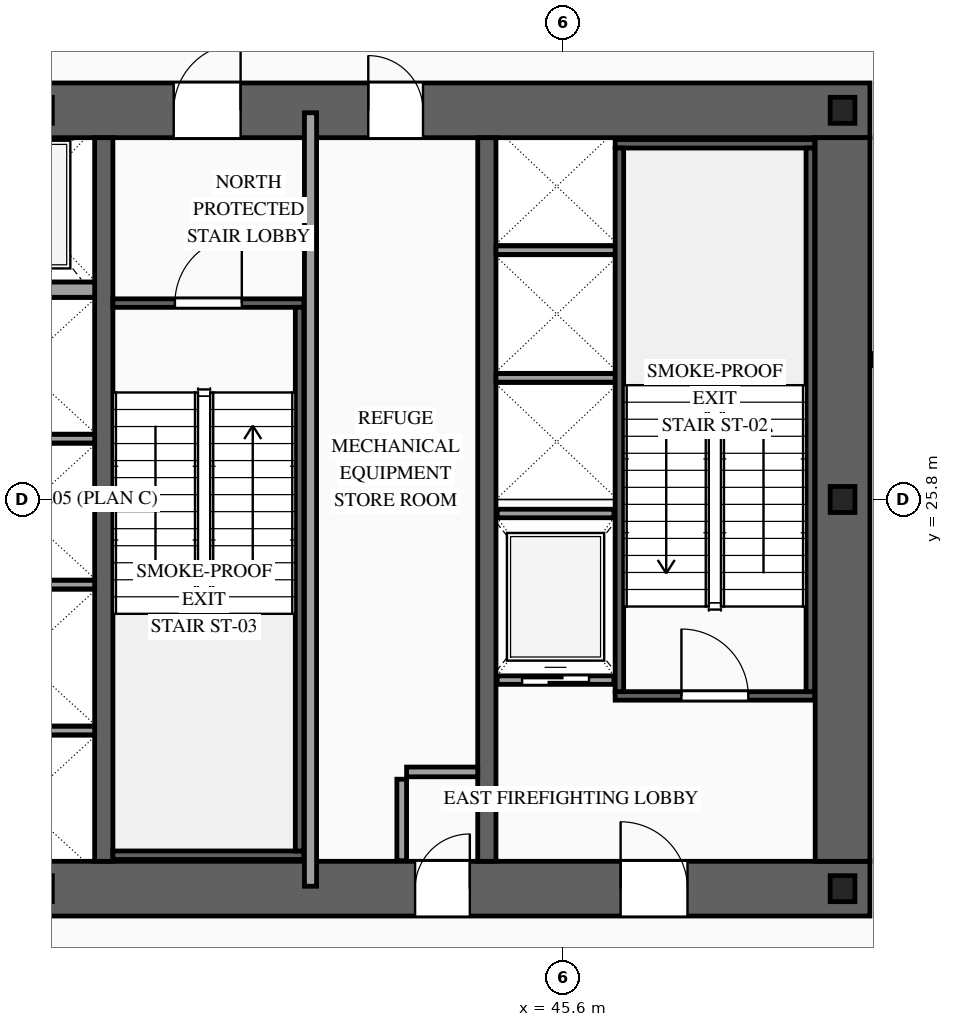
"""IFC4 building model, lengths in metres.
Left out: names, types, materials, properties, quantities, classifications, styles, units other than length and angle.
Written with IfcOpenShell. Run it as: python <this file> out.ifc"""

import sys

from ifc_helpers import new_model, si_unit, direction, frame, frame_2d, origin, origin_2d, place, context, subcontext, project, spatial, rectangle, i_section, extrude, source, transform, mapped, element, fill, save


model = new_model("IFC4")
c1 = context("Model", 3, precision=1e-05, world=origin(), true_north=direction((0.0, 1.0)))
c2 = subcontext(c1, "Body", "Model", "MODEL_VIEW")
j1 = project(units=[si_unit("LENGTHUNIT", "METRE"), si_unit("PLANEANGLEUNIT", "RADIAN")], contexts=[c1])
p1 = place(None, origin())
s1 = spatial("IfcSite", under=j1, at=p1, CompositionType="ELEMENT")
p2 = place(p1, origin())
s2 = spatial("IfcBuilding", under=s1, at=p2, CompositionType="ELEMENT")
p3 = place(p2, frame((0.0, 0.0, 41.4)))
s3 = spatial("IfcBuildingStorey", under=s2, at=p3, CompositionType="ELEMENT", Elevation=41.4)
p4 = place(p3, frame((23.35, 19.4, 0.0), z_axis=(0.0, 0.0, 1.0), x_axis=(1.0, 0.0, 0.0)))
e1 = element("IfcWall", 1, at=p4, inside=s3, PredefinedType="SHEAR", context=c2, shape_type="SweptSolid", body=[
    extrude(rectangle(XDim=27.3, YDim=0.9, at=frame_2d((13.65, 0.0))), origin(), (0.0, 0.0, 1.0), 4.6),
])
p5 = place(p4, frame((2.1, 0.0, 0.0)))
e2 = element("IfcOpeningElement", 2, at=p5, cuts=e1, PredefinedType="OPENING", context=c2, shape_type="SweptSolid", body=[
    extrude(rectangle(XDim=1.1, YDim=2.2, at=frame_2d((0.55, 1.1))), frame((0.0, 0.465, 0.0), z_axis=(0.0, -1.0, 0.0), x_axis=(1.0, 0.0, 0.0)), (0.0, 0.0, 1.0), 0.93),
])
p6 = place(p4, frame((10.0, 0.0, 0.0)))
e3 = element("IfcOpeningElement", 3, at=p6, cuts=e1, PredefinedType="OPENING", context=c2, shape_type="SweptSolid", body=[
    extrude(rectangle(XDim=1.1, YDim=2.2, at=frame_2d((0.55, 1.1))), frame((0.0, 0.465, 0.0), z_axis=(0.0, -1.0, 0.0), x_axis=(1.0, 0.0, 0.0)), (0.0, 0.0, 1.0), 0.93),
])
p7 = place(p4, frame((23.2, 0.0, 0.0)))
e4 = element("IfcOpeningElement", 4, at=p7, cuts=e1, PredefinedType="OPENING", context=c2, shape_type="SweptSolid", body=[
    extrude(rectangle(XDim=1.1, YDim=2.2, at=frame_2d((0.55, 1.1))), frame((0.0, 0.465, 0.0), z_axis=(0.0, -1.0, 0.0), x_axis=(1.0, 0.0, 0.0)), (0.0, 0.0, 1.0), 0.93),
])
p8 = place(p4, frame((19.82, 0.0, 0.0)))
e5 = element("IfcOpeningElement", 5, at=p8, cuts=e1, PredefinedType="OPENING", context=c2, shape_type="SweptSolid", body=[
    extrude(rectangle(XDim=0.9, YDim=2.15, at=frame_2d((0.45, 1.075))), frame((0.0, 0.465, 0.0), z_axis=(0.0, -1.0, 0.0), x_axis=(1.0, 0.0, 0.0)), (0.0, 0.0, 1.0), 0.93),
])
p9 = place(p3, frame((23.35, 32.2, 0.0), z_axis=(0.0, 0.0, 1.0), x_axis=(1.0, 0.0, 0.0)))
e6 = element("IfcWall", 6, at=p9, inside=s3, PredefinedType="SHEAR", context=c2, shape_type="SweptSolid", body=[
    extrude(rectangle(XDim=27.3, YDim=0.9, at=frame_2d((13.65, 0.0))), origin(), (0.0, 0.0, 1.0), 4.6),
])
p10 = place(p9, frame((4.72, 0.0, 0.0)))
e7 = element("IfcOpeningElement", 7, at=p10, cuts=e6, PredefinedType="OPENING", context=c2, shape_type="SweptSolid", body=[
    extrude(rectangle(XDim=0.9, YDim=2.15, at=frame_2d((0.45, 1.075))), frame((0.0, 0.465, 0.0), z_axis=(0.0, -1.0, 0.0), x_axis=(1.0, 0.0, 0.0)), (0.0, 0.0, 1.0), 0.93),
])
p11 = place(p9, frame((10.0, 0.0, 0.0)))
e8 = element("IfcOpeningElement", 8, at=p11, cuts=e6, PredefinedType="OPENING", context=c2, shape_type="SweptSolid", body=[
    extrude(rectangle(XDim=1.1, YDim=2.2, at=frame_2d((0.55, 1.1))), frame((0.0, 0.465, 0.0), z_axis=(0.0, -1.0, 0.0), x_axis=(1.0, 0.0, 0.0)), (0.0, 0.0, 1.0), 0.93),
])
p12 = place(p9, frame((15.85, 0.0, 0.0)))
e9 = element("IfcOpeningElement", 9, at=p12, cuts=e6, PredefinedType="OPENING", context=c2, shape_type="SweptSolid", body=[
    extrude(rectangle(XDim=1.1, YDim=2.2, at=frame_2d((0.55, 1.1))), frame((0.0, 0.465, 0.0), z_axis=(0.0, -1.0, 0.0), x_axis=(1.0, 0.0, 0.0)), (0.0, 0.0, 1.0), 0.93),
])
p13 = place(p9, frame((19.05, 0.0, 0.0)))
e10 = element("IfcOpeningElement", 10, at=p13, cuts=e6, PredefinedType="OPENING", context=c2, shape_type="SweptSolid", body=[
    extrude(rectangle(XDim=0.9, YDim=2.15, at=frame_2d((0.45, 1.075))), frame((0.0, 0.465, 0.0), z_axis=(0.0, -1.0, 0.0), x_axis=(1.0, 0.0, 0.0)), (0.0, 0.0, 1.0), 0.93),
])
m1 = source(origin(), c2, "Body", "SweptSolid", [
    extrude(rectangle(XDim=11.9, YDim=0.9, at=frame_2d((5.95, 0.0))), origin(), (0.0, 0.0, 1.0), 4.6),
])
p14 = place(p3, frame((50.2, 19.85, 0.0), z_axis=(0.0, 0.0, 1.0), x_axis=(0.0, 1.0, 0.0)))
e11 = element("IfcWall", 11, at=p14, inside=s3, PredefinedType="SHEAR", context=c2, shape_type="MappedRepresentation", body=[
    mapped(m1, transform((0.0, 0.0, 0.0), scale=1.0)),
])
m2 = source(origin(), c2, "Body", "SweptSolid", [
    extrude(rectangle(XDim=11.9, YDim=0.3, at=frame_2d((5.95, 0.0))), origin(), (0.0, 0.0, 1.0), 4.6),
])
for number, where, z_axis, x_axis in (
    (12, (38.05, 19.85, 0.0), (0.0, 0.0, 1.0), (0.0, 1.0, 0.0)),
    (13, (44.35, 19.85, 0.0), (0.0, 0.0, 1.0), (0.0, 1.0, 0.0)),
):
    element("IfcWall", number, at=place(p3, frame(where, z_axis=z_axis, x_axis=x_axis)), inside=s3, PredefinedType="SOLIDWALL", context=c2, shape_type="MappedRepresentation", body=[
        mapped(m2, transform((0.0, 0.0, 0.0), scale=1.0)),
    ])
m3 = source(origin(), c2, "Body", "SweptSolid", [
    extrude(i_section(OverallWidth=0.407, OverallDepth=0.428, WebThickness=0.02, FlangeThickness=0.035, at=origin_2d()), origin(), (0.0, 0.0, 1.0), 4.6),
])
for number, where, z_axis, x_axis in (
    (14, (37.0, 19.4, 0.0), (0.0, 0.0, 1.0), (1.0, 0.0, 0.0)),
    (15, (50.2, 19.4, 0.0), (0.0, 0.0, 1.0), (1.0, 0.0, 0.0)),
    (16, (50.2, 25.8, 0.0), (0.0, 0.0, 1.0), (1.0, 0.0, 0.0)),
    (17, (37.0, 32.2, 0.0), (0.0, 0.0, 1.0), (1.0, 0.0, 0.0)),
    (18, (50.2, 32.2, 0.0), (0.0, 0.0, 1.0), (1.0, 0.0, 0.0)),
):
    element("IfcColumn", number, at=place(p3, frame(where, z_axis=z_axis, x_axis=x_axis)), inside=s3, PredefinedType="COLUMN", context=c2, shape_type="MappedRepresentation", body=[
        mapped(m3, transform((0.0, 0.0, 0.0), scale=1.0)),
    ])
p15 = place(p3, frame((44.52, 22.83, 0.0), z_axis=(0.0, 0.0, 1.0), x_axis=(1.0, 0.0, 0.0)))
e19 = element("IfcWall", 19, at=p15, inside=s3, PredefinedType="SOLIDWALL", context=c2, shape_type="SweptSolid", body=[
    extrude(rectangle(XDim=1.92, YDim=0.14, at=frame_2d((0.96, 0.0))), origin(), (0.0, 0.0, 1.0), 4.38),
])
p16 = place(p15, frame((0.41, 0.0, 0.0)))
e20 = element("IfcOpeningElement", 20, at=p16, cuts=e19, PredefinedType="OPENING", context=c2, shape_type="SweptSolid", body=[
    extrude(rectangle(XDim=1.1, YDim=2.2, at=frame_2d((0.55, 1.1))), frame((0.0, 0.085, 0.0), z_axis=(0.0, -1.0, 0.0), x_axis=(1.0, 0.0, 0.0)), (0.0, 0.0, 1.0), 0.17),
])
m4 = source(origin(), c2, "Body", "SweptSolid", [
    extrude(rectangle(XDim=1.92, YDim=0.14, at=frame_2d((0.96, 0.0))), origin(), (0.0, 0.0, 1.0), 4.38),
])
p17 = place(p3, frame((44.52, 25.57, 0.0), z_axis=(0.0, 0.0, 1.0), x_axis=(1.0, 0.0, 0.0)))
e21 = element("IfcWall", 21, at=p17, inside=s3, PredefinedType="SOLIDWALL", context=c2, shape_type="MappedRepresentation", body=[
    mapped(m4, transform((0.0, 0.0, 0.0), scale=1.0)),
])
m5 = source(origin(), c2, "Body", "SweptSolid", [
    extrude(rectangle(XDim=2.4, YDim=0.14, at=frame_2d((1.2, 0.0))), origin(), (0.0, 0.0, 1.0), 4.38),
])
for number, where, z_axis, x_axis in (
    (22, (35.5, 22.0, 0.0), (0.0, 0.0, 1.0), (1.0, 0.0, 0.0)),
    (23, (35.5, 24.4, 0.0), (0.0, 0.0, 1.0), (1.0, 0.0, 0.0)),
    (24, (35.5, 26.8, 0.0), (0.0, 0.0, 1.0), (1.0, 0.0, 0.0)),
):
    element("IfcWall", number, at=place(p3, frame(where, z_axis=z_axis, x_axis=x_axis)), inside=s3, PredefinedType="SOLIDWALL", context=c2, shape_type="MappedRepresentation", body=[
        mapped(m5, transform((0.0, 0.0, 0.0), scale=1.0)),
    ])
m6 = source(origin(), c2, "Body", "SweptSolid", [
    extrude(rectangle(XDim=2.4, YDim=0.25, at=frame_2d((1.2, 0.0))), origin(), (0.0, 0.0, 1.0), 4.38),
])
p18 = place(p3, frame((35.5, 29.25, 0.0), z_axis=(0.0, 0.0, 1.0), x_axis=(1.0, 0.0, 0.0)))
e25 = element("IfcWall", 25, at=p18, inside=s3, PredefinedType="SOLIDWALL", context=c2, shape_type="MappedRepresentation", body=[
    mapped(m6, transform((0.0, 0.0, 0.0), scale=1.0)),
])
m7 = source(origin(), c2, "Body", "SweptSolid", [
    extrude(rectangle(XDim=2.0, YDim=0.14, at=frame_2d((1.0, 0.0))), origin(), (0.0, 0.0, 1.0), 4.38),
])
for number, where, z_axis, x_axis in (
    (26, (44.5, 27.8, 0.0), (0.0, 0.0, 1.0), (1.0, 0.0, 0.0)),
    (27, (44.5, 29.9, 0.0), (0.0, 0.0, 1.0), (1.0, 0.0, 0.0)),
):
    element("IfcWall", number, at=place(p3, frame(where, z_axis=z_axis, x_axis=x_axis)), inside=s3, PredefinedType="SOLIDWALL", context=c2, shape_type="MappedRepresentation", body=[
        mapped(m7, transform((0.0, 0.0, 0.0), scale=1.0)),
    ])
p19 = place(p3, frame((46.46, 22.57, 0.0), z_axis=(0.0, 0.0, 1.0), x_axis=(1.0, 0.0, 0.0)))
e28 = element("IfcWall", 28, at=p19, inside=s3, PredefinedType="SOLIDWALL", context=c2, shape_type="SweptSolid", body=[
    extrude(rectangle(XDim=3.28, YDim=0.14, at=frame_2d((1.64, 0.0))), origin(), (0.0, 0.0, 1.0), 4.38),
])
p20 = place(p19, frame((1.09, 0.0, 0.0)))
e29 = element("IfcOpeningElement", 29, at=p20, cuts=e28, PredefinedType="OPENING", context=c2, shape_type="SweptSolid", body=[
    extrude(rectangle(XDim=1.1, YDim=2.2, at=frame_2d((0.55, 1.1))), frame((0.0, 0.085, 0.0), z_axis=(0.0, -1.0, 0.0), x_axis=(1.0, 0.0, 0.0)), (0.0, 0.0, 1.0), 0.17),
])
m8 = source(origin(), c2, "Body", "SweptSolid", [
    extrude(rectangle(XDim=3.28, YDim=0.14, at=frame_2d((1.64, 0.0))), origin(), (0.0, 0.0, 1.0), 4.38),
])
p21 = place(p3, frame((46.46, 31.65, 0.0), z_axis=(0.0, 0.0, 1.0), x_axis=(1.0, 0.0, 0.0)))
e30 = element("IfcWall", 30, at=p21, inside=s3, PredefinedType="SOLIDWALL", context=c2, shape_type="MappedRepresentation", body=[
    mapped(m8, transform((0.0, 0.0, 0.0), scale=1.0)),
])
m9 = source(origin(), c2, "Body", "SweptSolid", [
    extrude(rectangle(XDim=8.94, YDim=0.14, at=frame_2d((4.47, 0.0))), origin(), (0.0, 0.0, 1.0), 4.38),
])
for number, where, z_axis, x_axis in (
    (31, (46.53, 22.64, 0.0), (0.0, 0.0, 1.0), (0.0, 1.0, 0.0)),
    (32, (49.67, 22.64, 0.0), (0.0, 0.0, 1.0), (0.0, 1.0, 0.0)),
):
    element("IfcWall", number, at=place(p3, frame(where, z_axis=z_axis, x_axis=x_axis)), inside=s3, PredefinedType="SOLIDWALL", context=c2, shape_type="MappedRepresentation", body=[
        mapped(m9, transform((0.0, 0.0, 0.0), scale=1.0)),
    ])
p22 = place(p3, frame((38.2, 29.03, 0.0), z_axis=(0.0, 0.0, 1.0), x_axis=(1.0, 0.0, 0.0)))
e33 = element("IfcWall", 33, at=p22, inside=s3, PredefinedType="SOLIDWALL", context=c2, shape_type="SweptSolid", body=[
    extrude(rectangle(XDim=3.14, YDim=0.14, at=frame_2d((1.57, 0.0))), origin(), (0.0, 0.0, 1.0), 4.38),
])
p23 = place(p22, frame((1.02, 0.0, 0.0)))
e34 = element("IfcOpeningElement", 34, at=p23, cuts=e33, PredefinedType="OPENING", context=c2, shape_type="SweptSolid", body=[
    extrude(rectangle(XDim=1.1, YDim=2.2, at=frame_2d((0.55, 1.1))), frame((0.0, 0.085, 0.0), z_axis=(0.0, -1.0, 0.0), x_axis=(1.0, 0.0, 0.0)), (0.0, 0.0, 1.0), 0.17),
])
m10 = source(origin(), c2, "Body", "SweptSolid", [
    extrude(rectangle(XDim=3.14, YDim=0.14, at=frame_2d((1.57, 0.0))), origin(), (0.0, 0.0, 1.0), 4.38),
])
p24 = place(p3, frame((38.2, 19.95, 0.0), z_axis=(0.0, 0.0, 1.0), x_axis=(1.0, 0.0, 0.0)))
e35 = element("IfcWall", 35, at=p24, inside=s3, PredefinedType="SOLIDWALL", context=c2, shape_type="MappedRepresentation", body=[
    mapped(m10, transform((0.0, 0.0, 0.0), scale=1.0)),
])
m11 = source(origin(), c2, "Body", "SweptSolid", [
    extrude(rectangle(XDim=8.94, YDim=0.14, at=frame_2d((4.47, 0.0))), origin(), (0.0, 0.0, 1.0), 4.38),
])
p25 = place(p3, frame((41.27, 20.02, 0.0), z_axis=(0.0, 0.0, 1.0), x_axis=(0.0, 1.0, 0.0)))
e36 = element("IfcWall", 36, at=p25, inside=s3, PredefinedType="SOLIDWALL", context=c2, shape_type="MappedRepresentation", body=[
    mapped(m11, transform((0.0, 0.0, 0.0), scale=1.0)),
])
m12 = source(origin(), c2, "Body", "SweptSolid", [
    extrude(rectangle(XDim=1.34, YDim=0.16, at=frame_2d((0.67, 0.0))), origin(), (0.0, 0.0, 1.0), 4.38),
])
p26 = place(p3, frame((42.95, 19.86, 0.0), z_axis=(0.0, 0.0, 1.0), x_axis=(0.0, 1.0, 0.0)))
e37 = element("IfcWall", 37, at=p26, inside=s3, PredefinedType="PARTITIONING", context=c2, shape_type="MappedRepresentation", body=[
    mapped(m12, transform((0.0, 0.0, 0.0), scale=1.0)),
])
m13 = source(origin(), c2, "Body", "SweptSolid", [
    extrude(rectangle(XDim=1.17, YDim=0.16, at=frame_2d((0.585, 0.0))), origin(), (0.0, 0.0, 1.0), 4.38),
])
p27 = place(p3, frame((43.03, 21.32, 0.0), z_axis=(0.0, 0.0, 1.0), x_axis=(1.0, 0.0, 0.0)))
e38 = element("IfcWall", 38, at=p27, inside=s3, PredefinedType="PARTITIONING", context=c2, shape_type="MappedRepresentation", body=[
    mapped(m13, transform((0.0, 0.0, 0.0), scale=1.0)),
])
m14 = source(origin(), c2, "Body", "SweptSolid", [
    extrude(rectangle(XDim=12.72, YDim=0.2, at=frame_2d((6.36, 0.0))), origin(), (0.0, 0.0, 1.0), 4.38),
])
p28 = place(p3, frame((41.45, 19.44, 0.0), z_axis=(0.0, 0.0, 1.0), x_axis=(0.0, 1.0, 0.0)))
e39 = element("IfcWall", 39, at=p28, inside=s3, PredefinedType="PARTITIONING", context=c2, shape_type="MappedRepresentation", body=[
    mapped(m14, transform((0.0, 0.0, 0.0), scale=1.0)),
])
m15 = source(origin(), c2, "Body", "SweptSolid", [
    extrude(rectangle(XDim=1.38, YDim=0.2, at=frame_2d((0.69, 0.0))), origin(), (0.0, 0.0, 1.0), 4.38),
])
p29 = place(p3, frame((50.67, 28.1, 0.0), z_axis=(0.0, 0.0, 1.0), x_axis=(1.0, 0.0, 0.0)))
e40 = element("IfcWall", 40, at=p29, inside=s3, PredefinedType="PARTITIONING", context=c2, shape_type="MappedRepresentation", body=[
    mapped(m15, transform((0.0, 0.0, 0.0), scale=1.0)),
])
m16 = source(origin(), c2, "Body", "SweptSolid", [
    extrude(rectangle(XDim=1.1, YDim=2.2, at=frame_2d((0.55, 1.1))), frame((0.0, 0.025, 0.0), z_axis=(0.0, -1.0, 0.0), x_axis=(1.0, 0.0, 0.0)), (0.0, 0.0, 1.0), 0.05),
])
p30 = place(p16, origin())
e41 = element("IfcDoor", 41, at=p30, inside=s3, OperationType="SLIDING_TO_RIGHT", PredefinedType="DOOR", context=c2, shape_type="MappedRepresentation", body=[
    mapped(m16, transform((0.0, 0.0, 0.0), scale=1.0)),
])
fill(e20, e41)
m17 = source(origin(), c2, "Body", "SweptSolid", [
    extrude(rectangle(XDim=1.1, YDim=2.2, at=frame_2d((0.55, 1.1))), frame((0.0, 0.025, 0.0), z_axis=(0.0, -1.0, 0.0), x_axis=(1.0, 0.0, 0.0)), (0.0, 0.0, 1.0), 0.05),
])
p31 = place(p20, origin())
e42 = element("IfcDoor", 42, at=p31, inside=s3, OperationType="SINGLE_SWING_LEFT", PredefinedType="DOOR", context=c2, shape_type="MappedRepresentation", body=[
    mapped(m17, transform((0.0, 0.0, 0.0), scale=1.0)),
])
fill(e29, e42)
p32 = place(p23, origin())
e43 = element("IfcDoor", 43, at=p32, inside=s3, OperationType="SINGLE_SWING_RIGHT", PredefinedType="DOOR", context=c2, shape_type="MappedRepresentation", body=[
    mapped(m17, transform((0.0, 0.0, 0.0), scale=1.0)),
])
fill(e34, e43)
p33 = place(p7, origin())
e44 = element("IfcDoor", 44, at=p33, inside=s3, OperationType="SINGLE_SWING_LEFT", PredefinedType="DOOR", context=c2, shape_type="MappedRepresentation", body=[
    mapped(m17, transform((0.0, 0.0, 0.0), scale=1.0)),
])
fill(e4, e44)
p34 = place(p12, origin())
e45 = element("IfcDoor", 45, at=p34, inside=s3, OperationType="SINGLE_SWING_RIGHT", PredefinedType="DOOR", context=c2, shape_type="MappedRepresentation", body=[
    mapped(m17, transform((0.0, 0.0, 0.0), scale=1.0)),
])
fill(e9, e45)
m18 = source(origin(), c2, "Body", "SweptSolid", [
    extrude(rectangle(XDim=0.9, YDim=2.15, at=frame_2d((0.45, 1.075))), frame((0.0, 0.025, 0.0), z_axis=(0.0, -1.0, 0.0), x_axis=(1.0, 0.0, 0.0)), (0.0, 0.0, 1.0), 0.05),
])
p35 = place(p8, origin())
e46 = element("IfcDoor", 46, at=p35, inside=s3, OperationType="SINGLE_SWING_RIGHT", PredefinedType="DOOR", context=c2, shape_type="MappedRepresentation", body=[
    mapped(m18, transform((0.0, 0.0, 0.0), scale=1.0)),
])
fill(e5, e46)
p36 = place(p13, origin())
e47 = element("IfcDoor", 47, at=p36, inside=s3, OperationType="SINGLE_SWING_LEFT", PredefinedType="DOOR", context=c2, shape_type="MappedRepresentation", body=[
    mapped(m18, transform((0.0, 0.0, 0.0), scale=1.0)),
])
fill(e10, e47)
save(model, sys.argv[1])
